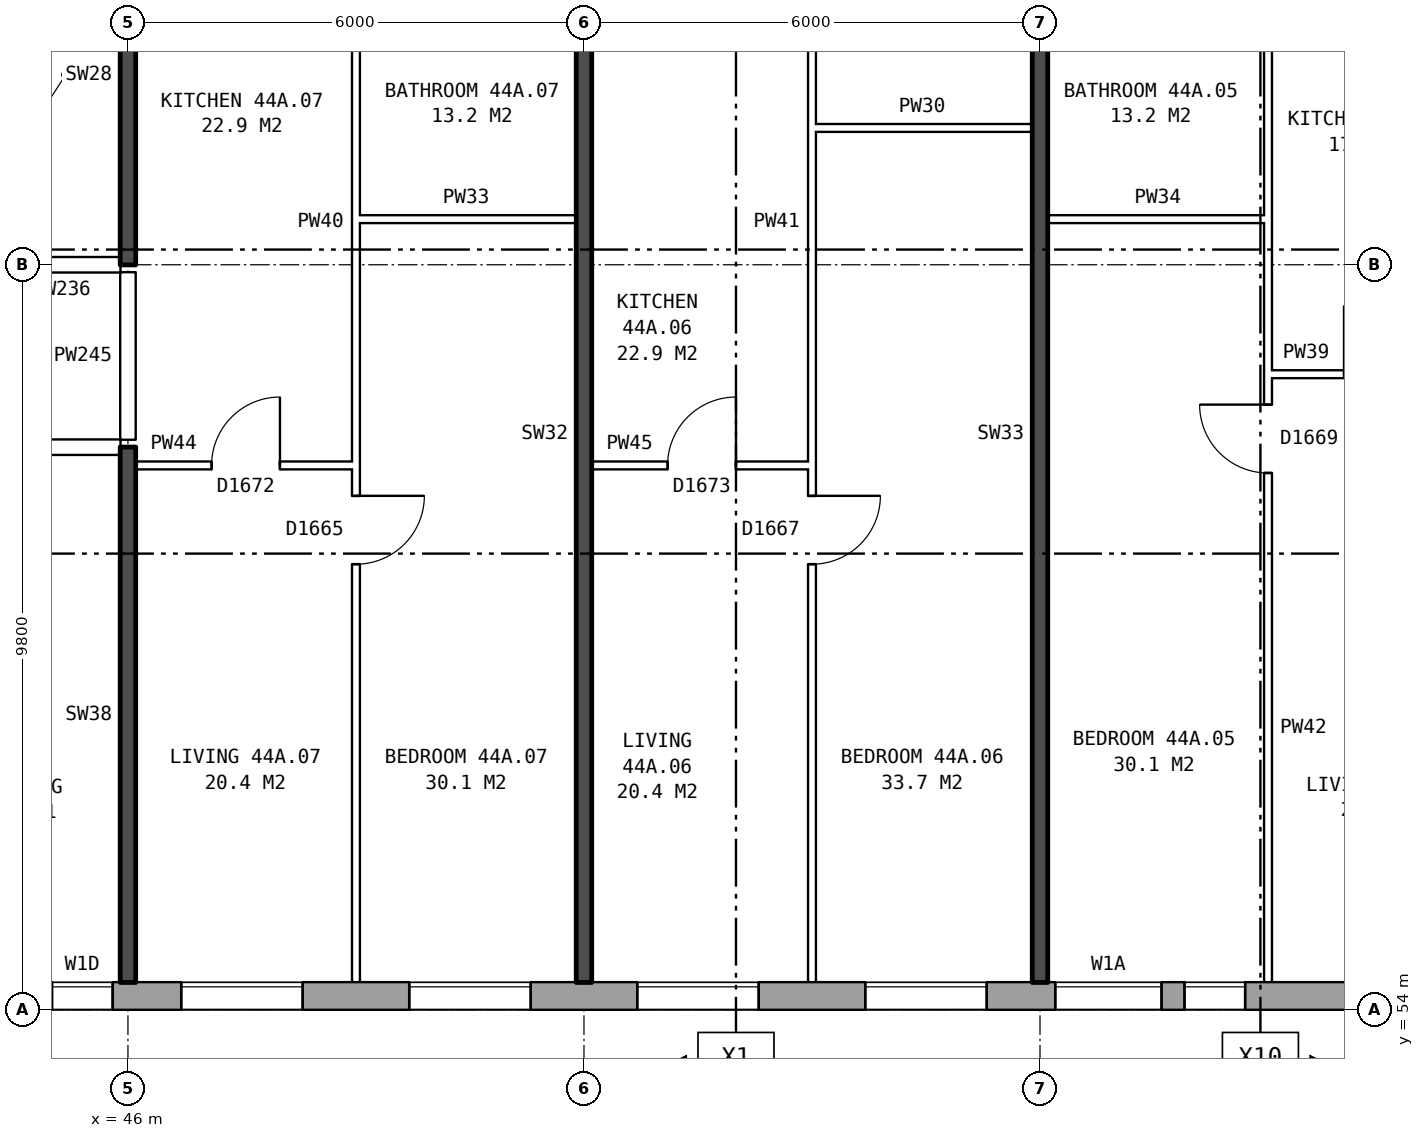
"""IFC4 building model, lengths in metres.
Left out: names, types, materials, properties, quantities, classifications, styles, units other than length and angle.
Written with IfcOpenShell. Run it as: python <this file> out.ifc"""

import sys

from ifc_helpers import new_model, si_unit, direction, frame, frame_2d, origin, place, context, subcontext, project, spatial, rectangle, extrude, element, fill, save


model = new_model("IFC4")
c1 = context("Model", 3, precision=1e-05, world=origin(), true_north=direction((0.0, 1.0)))
c2 = subcontext(c1, "Body", "Model", "MODEL_VIEW")
j1 = project(units=[si_unit("LENGTHUNIT", "METRE"), si_unit("PLANEANGLEUNIT", "RADIAN")], contexts=[c1])
p1 = place(None, origin())
s1 = spatial("IfcSite", under=j1, at=p1, CompositionType="ELEMENT")
p2 = place(p1, origin())
s2 = spatial("IfcBuilding", under=s1, at=p2, CompositionType="ELEMENT")
p3 = place(p2, frame((0.0, 0.0, 157.8)))
s3 = spatial("IfcBuildingStorey", under=s2, at=p3, CompositionType="ELEMENT", Elevation=157.8)
p4 = place(p3, frame((31.575, 54.18, 0.0), z_axis=(0.0, 0.0, 1.0), x_axis=(1.0, 0.0, 0.0)))
e1 = element("IfcWall", 1, at=p4, inside=s3, PredefinedType="STANDARD", context=c2, shape_type="SweptSolid", body=[
    extrude(rectangle(XDim=41.351, YDim=0.36, at=frame_2d((20.675, 0.0))), origin(), (0.0, 0.0, 1.0), 2.85),
])
p5 = place(p4, frame((3.125, 0.0, 0.8)))
e2 = element("IfcOpeningElement", 2, at=p5, cuts=e1, PredefinedType="OPENING", context=c2, shape_type="SweptSolid", body=[
    extrude(rectangle(XDim=1.6, YDim=1.8, at=frame_2d((0.8, 0.9))), frame((0.0, 0.19, 0.0), z_axis=(0.0, -1.0, 0.0), x_axis=(1.0, 0.0, 0.0)), (0.0, 0.0, 1.0), 0.38),
])
p6 = place(p4, frame((6.125, 0.0, 0.8)))
e3 = element("IfcOpeningElement", 3, at=p6, cuts=e1, PredefinedType="OPENING", context=c2, shape_type="SweptSolid", body=[
    extrude(rectangle(XDim=1.6, YDim=1.8, at=frame_2d((0.8, 0.9))), frame((0.0, 0.19, 0.0), z_axis=(0.0, -1.0, 0.0), x_axis=(1.0, 0.0, 0.0)), (0.0, 0.0, 1.0), 0.38),
])
p7 = place(p4, frame((8.625, 0.0, 0.8)))
e4 = element("IfcOpeningElement", 4, at=p7, cuts=e1, PredefinedType="OPENING", context=c2, shape_type="SweptSolid", body=[
    extrude(rectangle(XDim=1.0, YDim=1.8, at=frame_2d((0.5, 0.9))), frame((0.0, 0.19, 0.0), z_axis=(0.0, -1.0, 0.0), x_axis=(1.0, 0.0, 0.0)), (0.0, 0.0, 1.0), 0.38),
])
p8 = place(p4, frame((9.925, 0.0, 1.6)))
e5 = element("IfcOpeningElement", 5, at=p8, cuts=e1, PredefinedType="OPENING", context=c2, shape_type="SweptSolid", body=[
    extrude(rectangle(XDim=0.8, YDim=0.9, at=frame_2d((0.4, 0.45))), frame((0.0, 0.19, 0.0), z_axis=(0.0, -1.0, 0.0), x_axis=(1.0, 0.0, 0.0)), (0.0, 0.0, 1.0), 0.38),
])
p9 = place(p4, frame((15.125, 0.0, 0.8)))
e6 = element("IfcOpeningElement", 6, at=p9, cuts=e1, PredefinedType="OPENING", context=c2, shape_type="SweptSolid", body=[
    extrude(rectangle(XDim=1.6, YDim=1.8, at=frame_2d((0.8, 0.9))), frame((0.0, 0.19, 0.0), z_axis=(0.0, -1.0, 0.0), x_axis=(1.0, 0.0, 0.0)), (0.0, 0.0, 1.0), 0.38),
])
p10 = place(p4, frame((18.125, 0.0, 0.8)))
e7 = element("IfcOpeningElement", 7, at=p10, cuts=e1, PredefinedType="OPENING", context=c2, shape_type="SweptSolid", body=[
    extrude(rectangle(XDim=1.6, YDim=1.8, at=frame_2d((0.8, 0.9))), frame((0.0, 0.19, 0.0), z_axis=(0.0, -1.0, 0.0), x_axis=(1.0, 0.0, 0.0)), (0.0, 0.0, 1.0), 0.38),
])
p11 = place(p4, frame((21.125, 0.0, 0.8)))
e8 = element("IfcOpeningElement", 8, at=p11, cuts=e1, PredefinedType="OPENING", context=c2, shape_type="SweptSolid", body=[
    extrude(rectangle(XDim=1.6, YDim=1.8, at=frame_2d((0.8, 0.9))), frame((0.0, 0.19, 0.0), z_axis=(0.0, -1.0, 0.0), x_axis=(1.0, 0.0, 0.0)), (0.0, 0.0, 1.0), 0.38),
])
p12 = place(p4, frame((24.125, 0.0, 0.8)))
e9 = element("IfcOpeningElement", 9, at=p12, cuts=e1, PredefinedType="OPENING", context=c2, shape_type="SweptSolid", body=[
    extrude(rectangle(XDim=1.6, YDim=1.8, at=frame_2d((0.8, 0.9))), frame((0.0, 0.19, 0.0), z_axis=(0.0, -1.0, 0.0), x_axis=(1.0, 0.0, 0.0)), (0.0, 0.0, 1.0), 0.38),
])
p13 = place(p4, frame((26.625, 0.0, 0.8)))
e10 = element("IfcOpeningElement", 10, at=p13, cuts=e1, PredefinedType="OPENING", context=c2, shape_type="SweptSolid", body=[
    extrude(rectangle(XDim=1.4, YDim=1.8, at=frame_2d((0.7, 0.9))), frame((0.0, 0.19, 0.0), z_axis=(0.0, -1.0, 0.0), x_axis=(1.0, 0.0, 0.0)), (0.0, 0.0, 1.0), 0.38),
])
p14 = place(p4, frame((30.475, 0.0, 1.7)))
e11 = element("IfcOpeningElement", 11, at=p14, cuts=e1, PredefinedType="OPENING", context=c2, shape_type="SweptSolid", body=[
    extrude(rectangle(XDim=0.8, YDim=0.9, at=frame_2d((0.4, 0.45))), frame((0.0, 0.19, 0.0), z_axis=(0.0, -1.0, 0.0), x_axis=(1.0, 0.0, 0.0)), (0.0, 0.0, 1.0), 0.38),
])
p15 = place(p4, frame((33.125, 0.0, 0.8)))
e12 = element("IfcOpeningElement", 12, at=p15, cuts=e1, PredefinedType="OPENING", context=c2, shape_type="SweptSolid", body=[
    extrude(rectangle(XDim=1.6, YDim=1.8, at=frame_2d((0.8, 0.9))), frame((0.0, 0.19, 0.0), z_axis=(0.0, -1.0, 0.0), x_axis=(1.0, 0.0, 0.0)), (0.0, 0.0, 1.0), 0.38),
])
p16 = place(p4, frame((36.125, 0.0, 0.8)))
e13 = element("IfcOpeningElement", 13, at=p16, cuts=e1, PredefinedType="OPENING", context=c2, shape_type="SweptSolid", body=[
    extrude(rectangle(XDim=1.6, YDim=1.8, at=frame_2d((0.8, 0.9))), frame((0.0, 0.19, 0.0), z_axis=(0.0, -1.0, 0.0), x_axis=(1.0, 0.0, 0.0)), (0.0, 0.0, 1.0), 0.38),
])
p17 = place(p4, frame((39.125, 0.0, 0.8)))
e14 = element("IfcOpeningElement", 14, at=p17, cuts=e1, PredefinedType="OPENING", context=c2, shape_type="SweptSolid", body=[
    extrude(rectangle(XDim=1.6, YDim=1.8, at=frame_2d((0.8, 0.9))), frame((0.0, 0.19, 0.0), z_axis=(0.0, -1.0, 0.0), x_axis=(1.0, 0.0, 0.0)), (0.0, 0.0, 1.0), 0.38),
])
p18 = place(p4, frame((12.125, 0.0, 0.8)))
e15 = element("IfcOpeningElement", 15, at=p18, cuts=e1, PredefinedType="OPENING", context=c2, shape_type="SweptSolid", body=[
    extrude(rectangle(XDim=1.0, YDim=0.9, at=frame_2d((0.5, 0.45))), frame((0.0, 0.19, 0.0), z_axis=(0.0, -1.0, 0.0), x_axis=(1.0, 0.0, 0.0)), (0.0, 0.0, 1.0), 0.38),
])
p19 = place(p4, frame((13.425, 0.0, 0.8)))
e16 = element("IfcOpeningElement", 16, at=p19, cuts=e1, PredefinedType="OPENING", context=c2, shape_type="SweptSolid", body=[
    extrude(rectangle(XDim=0.8, YDim=1.8, at=frame_2d((0.4, 0.9))), frame((0.0, 0.19, 0.0), z_axis=(0.0, -1.0, 0.0), x_axis=(1.0, 0.0, 0.0)), (0.0, 0.0, 1.0), 0.38),
])
p20 = place(p4, frame((28.325, 0.0, 0.8)))
e17 = element("IfcOpeningElement", 17, at=p20, cuts=e1, PredefinedType="OPENING", context=c2, shape_type="SweptSolid", body=[
    extrude(rectangle(XDim=0.8, YDim=0.9, at=frame_2d((0.4, 0.45))), frame((0.0, 0.19, 0.0), z_axis=(0.0, -1.0, 0.0), x_axis=(1.0, 0.0, 0.0)), (0.0, 0.0, 1.0), 0.38),
])
p21 = place(p4, frame((31.625, 0.0, 0.8)))
e18 = element("IfcOpeningElement", 18, at=p21, cuts=e1, PredefinedType="OPENING", context=c2, shape_type="SweptSolid", body=[
    extrude(rectangle(XDim=0.6, YDim=1.8, at=frame_2d((0.3, 0.9))), frame((0.0, 0.19, 0.0), z_axis=(0.0, -1.0, 0.0), x_axis=(1.0, 0.0, 0.0)), (0.0, 0.0, 1.0), 0.38),
])
p22 = place(p3, frame((46.1, 61.16, 0.0), z_axis=(0.0, 0.0, 1.0), x_axis=(1.0, 0.0, 0.0)))
e19 = element("IfcWall", 19, at=p22, inside=s3, PredefinedType="PARTITIONING", context=c2, shape_type="SweptSolid", body=[
    extrude(rectangle(XDim=2.9, YDim=0.1, at=frame_2d((1.45, 0.0))), origin(), (0.0, 0.0, 1.0), 2.85),
])
p23 = place(p22, frame((1.0, 0.0, 0.0)))
e20 = element("IfcOpeningElement", 20, at=p23, cuts=e19, PredefinedType="OPENING", context=c2, shape_type="SweptSolid", body=[
    extrude(rectangle(XDim=0.9, YDim=2.1, at=frame_2d((0.45, 1.05))), frame((0.0, 0.06, 0.0), z_axis=(0.0, -1.0, 0.0), x_axis=(1.0, 0.0, 0.0)), (0.0, 0.0, 1.0), 0.12),
])
p24 = place(p3, frame((52.1, 61.16, 0.0), z_axis=(0.0, 0.0, 1.0), x_axis=(1.0, 0.0, 0.0)))
e21 = element("IfcWall", 21, at=p24, inside=s3, PredefinedType="PARTITIONING", context=c2, shape_type="SweptSolid", body=[
    extrude(rectangle(XDim=2.9, YDim=0.1, at=frame_2d((1.45, 0.0))), origin(), (0.0, 0.0, 1.0), 2.85),
])
p25 = place(p24, frame((1.0, 0.0, 0.0)))
e22 = element("IfcOpeningElement", 22, at=p25, cuts=e21, PredefinedType="OPENING", context=c2, shape_type="SweptSolid", body=[
    extrude(rectangle(XDim=0.9, YDim=2.1, at=frame_2d((0.45, 1.05))), frame((0.0, 0.06, 0.0), z_axis=(0.0, -1.0, 0.0), x_axis=(1.0, 0.0, 0.0)), (0.0, 0.0, 1.0), 0.12),
])
p26 = place(p3, frame((28.86, 61.4, 0.0), z_axis=(0.0, 0.0, 1.0), x_axis=(1.0, 0.0, 0.0)))
e23 = element("IfcWall", 23, at=p26, inside=s3, PredefinedType="PARTITIONING", context=c2, shape_type="SweptSolid", body=[
    extrude(rectangle(XDim=17.04, YDim=0.2, at=frame_2d((8.52, 0.0))), origin(), (0.0, 0.0, 1.0), 2.85),
])
p27 = place(p26, frame((14.59, 0.0, 0.0)))
e24 = element("IfcOpeningElement", 24, at=p27, cuts=e23, PredefinedType="OPENING", context=c2, shape_type="SweptSolid", body=[
    extrude(rectangle(XDim=1.0, YDim=2.1, at=frame_2d((0.5, 1.05))), frame((0.0, 0.11, 0.0), z_axis=(0.0, -1.0, 0.0), x_axis=(1.0, 0.0, 0.0)), (0.0, 0.0, 1.0), 0.22),
])
p28 = place(p26, frame((7.64, 0.0, 0.0)))
e25 = element("IfcOpeningElement", 25, at=p28, cuts=e23, PredefinedType="OPENING", context=c2, shape_type="SweptSolid", body=[
    extrude(rectangle(XDim=1.0, YDim=2.1, at=frame_2d((0.5, 1.05))), frame((0.0, 0.11, 0.0), z_axis=(0.0, -1.0, 0.0), x_axis=(1.0, 0.0, 0.0)), (0.0, 0.0, 1.0), 0.22),
])
p29 = place(p3, frame((61.0, 62.36, 0.0), z_axis=(0.0, 0.0, 1.0), x_axis=(1.0, 0.0, 0.0)))
e26 = element("IfcWall", 26, at=p29, inside=s3, PredefinedType="PARTITIONING", context=c2, shape_type="SweptSolid", body=[
    extrude(rectangle(XDim=2.9, YDim=0.1, at=frame_2d((1.45, 0.0))), origin(), (0.0, 0.0, 1.0), 2.85),
])
p30 = place(p29, frame((1.0, 0.0, 0.0)))
e27 = element("IfcOpeningElement", 27, at=p30, cuts=e26, PredefinedType="OPENING", context=c2, shape_type="SweptSolid", body=[
    extrude(rectangle(XDim=0.9, YDim=2.1, at=frame_2d((0.45, 1.05))), frame((0.0, 0.06, 0.0), z_axis=(0.0, -1.0, 0.0), x_axis=(1.0, 0.0, 0.0)), (0.0, 0.0, 1.0), 0.12),
])
p31 = place(p3, frame((44.36, 63.8, 0.0), z_axis=(0.0, 0.0, 1.0), x_axis=(1.0, 0.0, 0.0)))
e28 = element("IfcWall", 28, at=p31, inside=s3, PredefinedType="PARTITIONING", context=c2, shape_type="SweptSolid", body=[
    extrude(rectangle(XDim=1.54, YDim=0.2, at=frame_2d((0.77, 0.0))), origin(), (0.0, 0.0, 1.0), 2.85),
])
for number, where, z_axis, x_axis in (
    (29, (49.0, 64.4, 0.0), (0.0, 0.0, 1.0), (1.0, 0.0, 0.0)),
    (30, (58.1, 64.4, 0.0), (0.0, 0.0, 1.0), (1.0, 0.0, 0.0)),
    (31, (55.0, 65.6, 0.0), (0.0, 0.0, 1.0), (1.0, 0.0, 0.0)),
):
    element("IfcWall", number, at=place(p3, frame(where, z_axis=z_axis, x_axis=x_axis)), inside=s3, PredefinedType="PARTITIONING", context=c2, shape_type="SweptSolid", body=[
        extrude(rectangle(XDim=2.9, YDim=0.1, at=frame_2d((1.45, 0.0))), origin(), (0.0, 0.0, 1.0), 2.85),
    ])
p32 = place(p3, frame((46.0, 54.36, 0.0), z_axis=(0.0, 0.0, 1.0), x_axis=(0.0, 1.0, 0.0)))
e32 = element("IfcWall", 32, at=p32, inside=s3, PredefinedType="SOLIDWALL", context=c2, shape_type="SweptSolid", body=[
    extrude(rectangle(XDim=7.04, YDim=0.2, at=frame_2d((3.52, 0.0))), origin(), (0.0, 0.0, 1.0), 2.85),
])
p33 = place(p3, frame((46.0, 61.5, 0.0), z_axis=(0.0, 0.0, 1.0), x_axis=(0.0, 1.0, 0.0)))
e33 = element("IfcWall", 33, at=p33, inside=s3, PredefinedType="PARTITIONING", context=c2, shape_type="SweptSolid", body=[
    extrude(rectangle(XDim=2.2, YDim=0.2, at=frame_2d((1.1, 0.0))), origin(), (0.0, 0.0, 1.0), 2.85),
])
p34 = place(p3, frame((46.0, 63.8, 0.0), z_axis=(0.0, 0.0, 1.0), x_axis=(0.0, 1.0, 0.0)))
e34 = element("IfcWall", 34, at=p34, inside=s3, PredefinedType="SOLIDWALL", context=c2, shape_type="SweptSolid", body=[
    extrude(rectangle(XDim=5.0, YDim=0.2, at=frame_2d((2.5, 0.0))), origin(), (0.0, 0.0, 1.0), 2.85),
])
p35 = place(p3, frame((49.0, 54.36, 0.0), z_axis=(0.0, 0.0, 1.0), x_axis=(0.0, 1.0, 0.0)))
e35 = element("IfcWall", 35, at=p35, inside=s3, PredefinedType="PARTITIONING", context=c2, shape_type="SweptSolid", body=[
    extrude(rectangle(XDim=14.34, YDim=0.1, at=frame_2d((7.17, 0.0))), origin(), (0.0, 0.0, 1.0), 2.85),
])
p36 = place(p35, frame((5.5, 0.0, 0.0)))
e36 = element("IfcOpeningElement", 36, at=p36, cuts=e35, PredefinedType="OPENING", context=c2, shape_type="SweptSolid", body=[
    extrude(rectangle(XDim=0.9, YDim=2.1, at=frame_2d((0.45, 1.05))), frame((0.0, 0.06, 0.0), z_axis=(0.0, -1.0, 0.0), x_axis=(1.0, 0.0, 0.0)), (0.0, 0.0, 1.0), 0.12),
])
p37 = place(p35, frame((13.04, 0.0, 0.0)))
e37 = element("IfcOpeningElement", 37, at=p37, cuts=e35, PredefinedType="OPENING", context=c2, shape_type="SweptSolid", body=[
    extrude(rectangle(XDim=0.9, YDim=2.1, at=frame_2d((0.45, 1.05))), frame((0.0, 0.06, 0.0), z_axis=(0.0, -1.0, 0.0), x_axis=(1.0, 0.0, 0.0)), (0.0, 0.0, 1.0), 0.12),
])
p38 = place(p3, frame((52.0, 54.36, 0.0), z_axis=(0.0, 0.0, 1.0), x_axis=(0.0, 1.0, 0.0)))
e38 = element("IfcWall", 38, at=p38, inside=s3, PredefinedType="SOLIDWALL", context=c2, shape_type="SweptSolid", body=[
    extrude(rectangle(XDim=14.44, YDim=0.2, at=frame_2d((7.22, 0.0))), origin(), (0.0, 0.0, 1.0), 2.85),
])
p39 = place(p3, frame((55.0, 54.36, 0.0), z_axis=(0.0, 0.0, 1.0), x_axis=(0.0, 1.0, 0.0)))
e39 = element("IfcWall", 39, at=p39, inside=s3, PredefinedType="PARTITIONING", context=c2, shape_type="SweptSolid", body=[
    extrude(rectangle(XDim=14.34, YDim=0.1, at=frame_2d((7.17, 0.0))), origin(), (0.0, 0.0, 1.0), 2.85),
])
p40 = place(p39, frame((5.5, 0.0, 0.0)))
e40 = element("IfcOpeningElement", 40, at=p40, cuts=e39, PredefinedType="OPENING", context=c2, shape_type="SweptSolid", body=[
    extrude(rectangle(XDim=0.9, YDim=2.1, at=frame_2d((0.45, 1.05))), frame((0.0, 0.06, 0.0), z_axis=(0.0, -1.0, 0.0), x_axis=(1.0, 0.0, 0.0)), (0.0, 0.0, 1.0), 0.12),
])
p41 = place(p39, frame((13.04, 0.0, 0.0)))
e41 = element("IfcOpeningElement", 41, at=p41, cuts=e39, PredefinedType="OPENING", context=c2, shape_type="SweptSolid", body=[
    extrude(rectangle(XDim=0.9, YDim=2.1, at=frame_2d((0.45, 1.05))), frame((0.0, 0.06, 0.0), z_axis=(0.0, -1.0, 0.0), x_axis=(1.0, 0.0, 0.0)), (0.0, 0.0, 1.0), 0.12),
])
p42 = place(p3, frame((58.0, 54.36, 0.0), z_axis=(0.0, 0.0, 1.0), x_axis=(0.0, 1.0, 0.0)))
e42 = element("IfcWall", 42, at=p42, inside=s3, PredefinedType="SOLIDWALL", context=c2, shape_type="SweptSolid", body=[
    extrude(rectangle(XDim=14.44, YDim=0.2, at=frame_2d((7.22, 0.0))), origin(), (0.0, 0.0, 1.0), 2.85),
])
p43 = place(p3, frame((61.0, 54.36, 0.0), z_axis=(0.0, 0.0, 1.0), x_axis=(0.0, 1.0, 0.0)))
e43 = element("IfcWall", 43, at=p43, inside=s3, PredefinedType="PARTITIONING", context=c2, shape_type="SweptSolid", body=[
    extrude(rectangle(XDim=14.34, YDim=0.1, at=frame_2d((7.17, 0.0))), origin(), (0.0, 0.0, 1.0), 2.85),
])
p44 = place(p43, frame((6.7, 0.0, 0.0)))
e44 = element("IfcOpeningElement", 44, at=p44, cuts=e43, PredefinedType="OPENING", context=c2, shape_type="SweptSolid", body=[
    extrude(rectangle(XDim=0.9, YDim=2.1, at=frame_2d((0.45, 1.05))), frame((0.0, 0.06, 0.0), z_axis=(0.0, -1.0, 0.0), x_axis=(1.0, 0.0, 0.0)), (0.0, 0.0, 1.0), 0.12),
])
p45 = place(p43, frame((12.54, 0.0, 0.0)))
e45 = element("IfcOpeningElement", 45, at=p45, cuts=e43, PredefinedType="OPENING", context=c2, shape_type="SweptSolid", body=[
    extrude(rectangle(XDim=0.9, YDim=2.1, at=frame_2d((0.45, 1.05))), frame((0.0, 0.06, 0.0), z_axis=(0.0, -1.0, 0.0), x_axis=(1.0, 0.0, 0.0)), (0.0, 0.0, 1.0), 0.12),
])
p46 = place(p9, origin())
e46 = element("IfcWindow", 46, at=p46, inside=s3, PartitioningType="SINGLE_PANEL", PredefinedType="WINDOW", context=c2, shape_type="SweptSolid", body=[
    extrude(rectangle(XDim=1.6, YDim=1.8, at=frame_2d((0.8, 0.9))), frame((0.0, 0.15, 0.0), z_axis=(0.0, -1.0, 0.0), x_axis=(1.0, 0.0, 0.0)), (0.0, 0.0, 1.0), 0.06),
])
fill(e6, e46)
p47 = place(p10, origin())
e47 = element("IfcWindow", 47, at=p47, inside=s3, PartitioningType="SINGLE_PANEL", PredefinedType="WINDOW", context=c2, shape_type="SweptSolid", body=[
    extrude(rectangle(XDim=1.6, YDim=1.8, at=frame_2d((0.8, 0.9))), frame((0.0, 0.15, 0.0), z_axis=(0.0, -1.0, 0.0), x_axis=(1.0, 0.0, 0.0)), (0.0, 0.0, 1.0), 0.06),
])
fill(e7, e47)
p48 = place(p11, origin())
e48 = element("IfcWindow", 48, at=p48, inside=s3, PartitioningType="SINGLE_PANEL", PredefinedType="WINDOW", context=c2, shape_type="SweptSolid", body=[
    extrude(rectangle(XDim=1.6, YDim=1.8, at=frame_2d((0.8, 0.9))), frame((0.0, 0.15, 0.0), z_axis=(0.0, -1.0, 0.0), x_axis=(1.0, 0.0, 0.0)), (0.0, 0.0, 1.0), 0.06),
])
fill(e8, e48)
p49 = place(p12, origin())
e49 = element("IfcWindow", 49, at=p49, inside=s3, PartitioningType="SINGLE_PANEL", PredefinedType="WINDOW", context=c2, shape_type="SweptSolid", body=[
    extrude(rectangle(XDim=1.6, YDim=1.8, at=frame_2d((0.8, 0.9))), frame((0.0, 0.15, 0.0), z_axis=(0.0, -1.0, 0.0), x_axis=(1.0, 0.0, 0.0)), (0.0, 0.0, 1.0), 0.06),
])
fill(e9, e49)
p50 = place(p13, origin())
e50 = element("IfcWindow", 50, at=p50, inside=s3, PartitioningType="SINGLE_PANEL", PredefinedType="WINDOW", context=c2, shape_type="SweptSolid", body=[
    extrude(rectangle(XDim=1.4, YDim=1.8, at=frame_2d((0.7, 0.9))), frame((0.0, 0.15, 0.0), z_axis=(0.0, -1.0, 0.0), x_axis=(1.0, 0.0, 0.0)), (0.0, 0.0, 1.0), 0.06),
])
fill(e10, e50)
p51 = place(p44, origin())
e51 = element("IfcDoor", 51, at=p51, inside=s3, OperationType="SINGLE_SWING_RIGHT", PredefinedType="DOOR", context=c2, shape_type="SweptSolid", body=[
    extrude(rectangle(XDim=0.9, YDim=2.1, at=frame_2d((0.45, 1.05))), frame((0.0, 0.025, 0.0), z_axis=(0.0, -1.0, 0.0), x_axis=(1.0, 0.0, 0.0)), (0.0, 0.0, 1.0), 0.05),
])
fill(e44, e51)
p52 = place(p40, frame((0.9, 0.0, 0.0), z_axis=(0.0, 0.0, 1.0), x_axis=(-1.0, 0.0, 0.0)))
e52 = element("IfcDoor", 52, at=p52, inside=s3, OperationType="SINGLE_SWING_LEFT", PredefinedType="DOOR", context=c2, shape_type="SweptSolid", body=[
    extrude(rectangle(XDim=0.9, YDim=2.1, at=frame_2d((0.45, 1.05))), frame((0.0, 0.025, 0.0), z_axis=(0.0, -1.0, 0.0), x_axis=(1.0, 0.0, 0.0)), (0.0, 0.0, 1.0), 0.05),
])
fill(e40, e52)
p53 = place(p25, origin())
e53 = element("IfcDoor", 53, at=p53, inside=s3, OperationType="SINGLE_SWING_RIGHT", PredefinedType="DOOR", context=c2, shape_type="SweptSolid", body=[
    extrude(rectangle(XDim=0.9, YDim=2.1, at=frame_2d((0.45, 1.05))), frame((0.0, 0.025, 0.0), z_axis=(0.0, -1.0, 0.0), x_axis=(1.0, 0.0, 0.0)), (0.0, 0.0, 1.0), 0.05),
])
fill(e22, e53)
p54 = place(p36, frame((0.9, 0.0, 0.0), z_axis=(0.0, 0.0, 1.0), x_axis=(-1.0, 0.0, 0.0)))
e54 = element("IfcDoor", 54, at=p54, inside=s3, OperationType="SINGLE_SWING_LEFT", PredefinedType="DOOR", context=c2, shape_type="SweptSolid", body=[
    extrude(rectangle(XDim=0.9, YDim=2.1, at=frame_2d((0.45, 1.05))), frame((0.0, 0.025, 0.0), z_axis=(0.0, -1.0, 0.0), x_axis=(1.0, 0.0, 0.0)), (0.0, 0.0, 1.0), 0.05),
])
fill(e36, e54)
p55 = place(p23, origin())
e55 = element("IfcDoor", 55, at=p55, inside=s3, OperationType="SINGLE_SWING_RIGHT", PredefinedType="DOOR", context=c2, shape_type="SweptSolid", body=[
    extrude(rectangle(XDim=0.9, YDim=2.1, at=frame_2d((0.45, 1.05))), frame((0.0, 0.025, 0.0), z_axis=(0.0, -1.0, 0.0), x_axis=(1.0, 0.0, 0.0)), (0.0, 0.0, 1.0), 0.05),
])
fill(e20, e55)
p56 = place(p19, origin())
e56 = element("IfcWindow", 56, at=p56, inside=s3, PartitioningType="SINGLE_PANEL", PredefinedType="WINDOW", context=c2, shape_type="SweptSolid", body=[
    extrude(rectangle(XDim=0.8, YDim=1.8, at=frame_2d((0.4, 0.9))), frame((0.0, 0.15, 0.0), z_axis=(0.0, -1.0, 0.0), x_axis=(1.0, 0.0, 0.0)), (0.0, 0.0, 1.0), 0.06),
])
fill(e16, e56)
p57 = place(p20, origin())
e57 = element("IfcWindow", 57, at=p57, inside=s3, PartitioningType="SINGLE_PANEL", PredefinedType="WINDOW", context=c2, shape_type="SweptSolid", body=[
    extrude(rectangle(XDim=0.8, YDim=0.9, at=frame_2d((0.4, 0.45))), frame((0.0, 0.15, 0.0), z_axis=(0.0, -1.0, 0.0), x_axis=(1.0, 0.0, 0.0)), (0.0, 0.0, 1.0), 0.06),
])
fill(e17, e57)
save(model, sys.argv[1])
